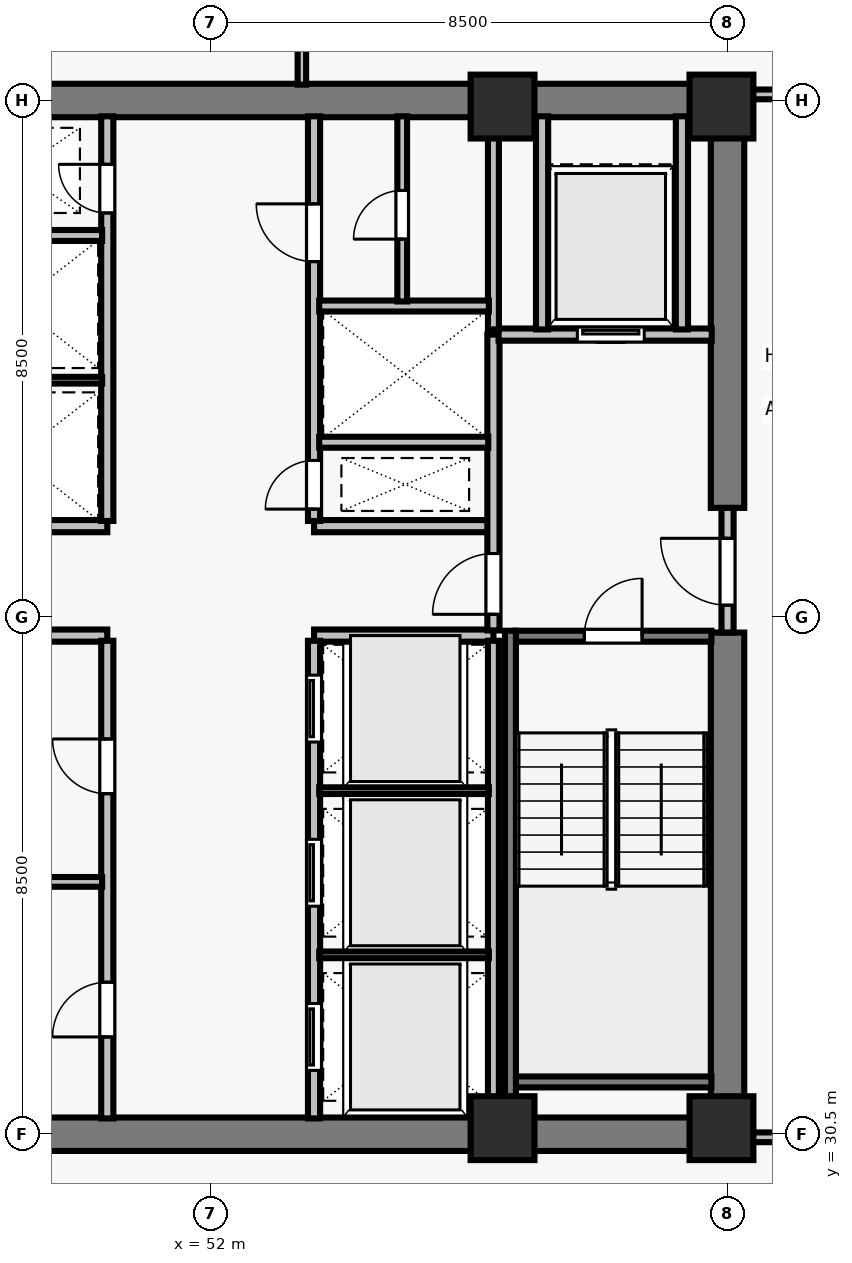
"""IFC4 building model, lengths in metres.
Left out: names, types, materials, properties, quantities, classifications, styles, units other than length and angle.
Written with IfcOpenShell. Run it as: python <this file> out.ifc"""

import sys

from ifc_helpers import new_model, si_unit, direction, frame, frame_2d, origin, origin_2d, place, context, subcontext, project, spatial, rectangle, extrude, element, fill, save


model = new_model("IFC4")
c1 = context("Model", 3, precision=1e-05, world=origin(), true_north=direction((0.0, 1.0)))
c2 = subcontext(c1, "Body", "Model", "MODEL_VIEW")
j1 = project(units=[si_unit("LENGTHUNIT", "METRE"), si_unit("PLANEANGLEUNIT", "RADIAN")], contexts=[c1])
p1 = place(None, origin())
s1 = spatial("IfcSite", under=j1, at=p1, CompositionType="ELEMENT")
p2 = place(p1, origin())
s2 = spatial("IfcBuilding", under=s1, at=p2, CompositionType="ELEMENT")
p3 = place(p2, frame((0.0, 0.0, 190.0)))
s3 = spatial("IfcBuildingStorey", under=s2, at=p3, CompositionType="ELEMENT", Elevation=190.0)
for number, where, z_axis, x_axis in (
    (1, (56.8, 30.6, 0.0), (0.0, 0.0, 1.0), (1.0, 0.0, 0.0)),
    (2, (60.4, 30.6, 0.0), (0.0, 0.0, 1.0), (1.0, 0.0, 0.0)),
    (3, (56.8, 47.4, 0.0), (0.0, 0.0, 1.0), (1.0, 0.0, 0.0)),
    (4, (60.4, 47.4, 0.0), (0.0, 0.0, 1.0), (1.0, 0.0, 0.0)),
):
    element("IfcColumn", number, at=place(p3, frame(where, z_axis=z_axis, x_axis=x_axis)), inside=s3, PredefinedType="COLUMN", context=c2, shape_type="SweptSolid", body=[
        extrude(rectangle(XDim=1.05, YDim=1.05, at=origin_2d()), origin(), (0.0, 0.0, 1.0), 3.5),
    ])
for number, where, z_axis, x_axis in (
    (5, (43.225, 30.5, 0.0), (0.0, 0.0, 1.0), (1.0, 0.0, 0.0)),
    (6, (43.225, 47.5, 0.0), (0.0, 0.0, 1.0), (1.0, 0.0, 0.0)),
):
    element("IfcWall", number, at=place(p3, frame(where, z_axis=z_axis, x_axis=x_axis)), inside=s3, PredefinedType="SHEAR", context=c2, shape_type="SweptSolid", body=[
        extrude(rectangle(XDim=17.55, YDim=0.55, at=frame_2d((8.775, 0.0))), origin(), (0.0, 0.0, 1.0), 3.24),
    ])
p4 = place(p3, frame((60.5, 30.765, 0.0), z_axis=(0.0, 0.0, 1.0), x_axis=(0.0, 1.0, 0.0)))
e7 = element("IfcWall", 7, at=p4, inside=s3, PredefinedType="SHEAR", context=c2, shape_type="SweptSolid", body=[
    extrude(rectangle(XDim=7.985, YDim=0.55, at=frame_2d((3.993, 0.0))), origin(), (0.0, 0.0, 1.0), 3.24),
])
p5 = place(p3, frame((60.5, 40.8, 0.0), z_axis=(0.0, 0.0, 1.0), x_axis=(0.0, 1.0, 0.0)))
e8 = element("IfcWall", 8, at=p5, inside=s3, PredefinedType="SHEAR", context=c2, shape_type="SweptSolid", body=[
    extrude(rectangle(XDim=6.435, YDim=0.55, at=frame_2d((3.218, 0.0))), origin(), (0.0, 0.0, 1.0), 3.24),
])
for number, where, z_axis, x_axis in (
    (9, (47.35, 38.7, 0.0), (0.0, 0.0, 1.0), (1.0, 0.0, 0.0)),
    (10, (47.35, 40.5, 0.0), (0.0, 0.0, 1.0), (1.0, 0.0, 0.0)),
    (11, (53.7, 38.7, 0.0), (0.0, 0.0, 1.0), (1.0, 0.0, 0.0)),
    (12, (53.7, 40.5, 0.0), (0.0, 0.0, 1.0), (1.0, 0.0, 0.0)),
):
    element("IfcWall", number, at=place(p3, frame(where, z_axis=z_axis, x_axis=x_axis)), inside=s3, PredefinedType="SOLIDWALL", context=c2, shape_type="SweptSolid", body=[
        extrude(rectangle(XDim=2.95, YDim=0.2, at=frame_2d((1.475, 0.0))), origin(), (0.0, 0.0, 1.0), 3.24),
    ])
p6 = place(p3, frame((50.3, 30.76, 0.0), z_axis=(0.0, 0.0, 1.0), x_axis=(0.0, 1.0, 0.0)))
e13 = element("IfcWall", 13, at=p6, inside=s3, PredefinedType="SOLIDWALL", context=c2, shape_type="SweptSolid", body=[
    extrude(rectangle(XDim=7.855, YDim=0.2, at=frame_2d((3.927, 0.0))), origin(), (0.0, 0.0, 1.0), 3.24),
])
p7 = place(p6, frame((1.34, 0.0, 0.0)))
e14 = element("IfcOpeningElement", 14, at=p7, cuts=e13, PredefinedType="OPENING", context=c2, shape_type="SweptSolid", body=[
    extrude(rectangle(XDim=0.9, YDim=2.12, at=frame_2d((0.45, 1.06))), frame((0.0, 0.11, 0.0), z_axis=(0.0, -1.0, 0.0), x_axis=(1.0, 0.0, 0.0)), (0.0, 0.0, 1.0), 0.22),
])
p8 = place(p6, frame((5.34, 0.0, 0.0)))
e15 = element("IfcOpeningElement", 15, at=p8, cuts=e13, PredefinedType="OPENING", context=c2, shape_type="SweptSolid", body=[
    extrude(rectangle(XDim=0.9, YDim=2.12, at=frame_2d((0.45, 1.06))), frame((0.0, 0.11, 0.0), z_axis=(0.0, -1.0, 0.0), x_axis=(1.0, 0.0, 0.0)), (0.0, 0.0, 1.0), 0.22),
])
p9 = place(p3, frame((53.7, 30.76, 0.0), z_axis=(0.0, 0.0, 1.0), x_axis=(0.0, 1.0, 0.0)))
e16 = element("IfcWall", 16, at=p9, inside=s3, PredefinedType="SOLIDWALL", context=c2, shape_type="SweptSolid", body=[
    extrude(rectangle(XDim=7.855, YDim=0.2, at=frame_2d((3.927, 0.0))), origin(), (0.0, 0.0, 1.0), 3.24),
])
p10 = place(p9, frame((0.79, 0.0, 0.0)))
e17 = element("IfcOpeningElement", 17, at=p10, cuts=e16, PredefinedType="OPENING", context=c2, shape_type="SweptSolid", body=[
    extrude(rectangle(XDim=1.1, YDim=2.2, at=frame_2d((0.55, 1.1))), frame((0.0, 0.11, 0.0), z_axis=(0.0, -1.0, 0.0), x_axis=(1.0, 0.0, 0.0)), (0.0, 0.0, 1.0), 0.22),
])
p11 = place(p9, frame((3.49, 0.0, 0.0)))
e18 = element("IfcOpeningElement", 18, at=p11, cuts=e16, PredefinedType="OPENING", context=c2, shape_type="SweptSolid", body=[
    extrude(rectangle(XDim=1.1, YDim=2.2, at=frame_2d((0.55, 1.1))), frame((0.0, 0.11, 0.0), z_axis=(0.0, -1.0, 0.0), x_axis=(1.0, 0.0, 0.0)), (0.0, 0.0, 1.0), 0.22),
])
p12 = place(p9, frame((6.19, 0.0, 0.0)))
e19 = element("IfcOpeningElement", 19, at=p12, cuts=e16, PredefinedType="OPENING", context=c2, shape_type="SweptSolid", body=[
    extrude(rectangle(XDim=1.1, YDim=2.2, at=frame_2d((0.55, 1.1))), frame((0.0, 0.11, 0.0), z_axis=(0.0, -1.0, 0.0), x_axis=(1.0, 0.0, 0.0)), (0.0, 0.0, 1.0), 0.22),
])
p13 = place(p3, frame((50.3, 40.585, 0.0), z_axis=(0.0, 0.0, 1.0), x_axis=(0.0, 1.0, 0.0)))
e20 = element("IfcWall", 20, at=p13, inside=s3, PredefinedType="SOLIDWALL", context=c2, shape_type="SweptSolid", body=[
    extrude(rectangle(XDim=6.655, YDim=0.2, at=frame_2d((3.328, 0.0))), origin(), (0.0, 0.0, 1.0), 3.24),
])
p14 = place(p13, frame((5.065, 0.0, 0.0)))
e21 = element("IfcOpeningElement", 21, at=p14, cuts=e20, PredefinedType="OPENING", context=c2, shape_type="SweptSolid", body=[
    extrude(rectangle(XDim=0.8, YDim=2.08, at=frame_2d((0.4, 1.04))), frame((0.0, 0.11, 0.0), z_axis=(0.0, -1.0, 0.0), x_axis=(1.0, 0.0, 0.0)), (0.0, 0.0, 1.0), 0.22),
])
p15 = place(p3, frame((53.7, 40.585, 0.0), z_axis=(0.0, 0.0, 1.0), x_axis=(0.0, 1.0, 0.0)))
e22 = element("IfcWall", 22, at=p15, inside=s3, PredefinedType="SOLIDWALL", context=c2, shape_type="SweptSolid", body=[
    extrude(rectangle(XDim=6.655, YDim=0.2, at=frame_2d((3.328, 0.0))), origin(), (0.0, 0.0, 1.0), 3.24),
])
p16 = place(p15, frame((0.195, 0.0, 0.0)))
e23 = element("IfcOpeningElement", 23, at=p16, cuts=e22, PredefinedType="OPENING", context=c2, shape_type="SweptSolid", body=[
    extrude(rectangle(XDim=0.8, YDim=2.08, at=frame_2d((0.4, 1.04))), frame((0.0, 0.11, 0.0), z_axis=(0.0, -1.0, 0.0), x_axis=(1.0, 0.0, 0.0)), (0.0, 0.0, 1.0), 0.22),
])
p17 = place(p15, frame((4.265, 0.0, 0.0)))
e24 = element("IfcOpeningElement", 24, at=p17, cuts=e22, PredefinedType="OPENING", context=c2, shape_type="SweptSolid", body=[
    extrude(rectangle(XDim=0.95, YDim=2.12, at=frame_2d((0.475, 1.06))), frame((0.0, 0.11, 0.0), z_axis=(0.0, -1.0, 0.0), x_axis=(1.0, 0.0, 0.0)), (0.0, 0.0, 1.0), 0.22),
])
p18 = place(p3, frame((60.5, 38.75, 0.0), z_axis=(0.0, 0.0, 1.0), x_axis=(0.0, 1.0, 0.0)))
e25 = element("IfcWall", 25, at=p18, inside=s3, PredefinedType="SOLIDWALL", context=c2, shape_type="SweptSolid", body=[
    extrude(rectangle(XDim=2.05, YDim=0.2, at=frame_2d((1.025, 0.0))), origin(), (0.0, 0.0, 1.0), 3.24),
])
p19 = place(p18, frame((0.45, 0.0, 0.0)))
e26 = element("IfcOpeningElement", 26, at=p19, cuts=e25, PredefinedType="OPENING", context=c2, shape_type="SweptSolid", body=[
    extrude(rectangle(XDim=1.1, YDim=2.15, at=frame_2d((0.55, 1.075))), frame((0.0, 0.11, 0.0), z_axis=(0.0, -1.0, 0.0), x_axis=(1.0, 0.0, 0.0)), (0.0, 0.0, 1.0), 0.22),
])
p20 = place(p3, frame((56.65, 38.785, 0.0), z_axis=(0.0, 0.0, 1.0), x_axis=(0.0, 1.0, 0.0)))
e27 = element("IfcWall", 27, at=p20, inside=s3, PredefinedType="SOLIDWALL", context=c2, shape_type="SweptSolid", body=[
    extrude(rectangle(XDim=4.865, YDim=0.2, at=frame_2d((2.433, 0.0))), origin(), (0.0, 0.0, 1.0), 3.24),
])
p21 = place(p20, frame((0.265, 0.0, 0.0)))
e28 = element("IfcOpeningElement", 28, at=p21, cuts=e27, PredefinedType="OPENING", context=c2, shape_type="SweptSolid", body=[
    extrude(rectangle(XDim=1.0, YDim=2.15, at=frame_2d((0.5, 1.075))), frame((0.0, 0.11, 0.0), z_axis=(0.0, -1.0, 0.0), x_axis=(1.0, 0.0, 0.0)), (0.0, 0.0, 1.0), 0.22),
])
p22 = place(p3, frame((56.735, 43.65, 0.0), z_axis=(0.0, 0.0, 1.0), x_axis=(1.0, 0.0, 0.0)))
e29 = element("IfcWall", 29, at=p22, inside=s3, PredefinedType="SOLIDWALL", context=c2, shape_type="SweptSolid", body=[
    extrude(rectangle(XDim=3.505, YDim=0.2, at=frame_2d((1.752, 0.0))), origin(), (0.0, 0.0, 1.0), 3.24),
])
p23 = place(p22, frame((1.295, 0.0, 0.0)))
e30 = element("IfcOpeningElement", 30, at=p23, cuts=e29, PredefinedType="OPENING", context=c2, shape_type="SweptSolid", body=[
    extrude(rectangle(XDim=1.1, YDim=2.2, at=frame_2d((0.55, 1.1))), frame((0.0, 0.11, 0.0), z_axis=(0.0, -1.0, 0.0), x_axis=(1.0, 0.0, 0.0)), (0.0, 0.0, 1.0), 0.22),
])
for number, where, z_axis, x_axis in (
    (31, (57.45, 43.735, 0.0), (0.0, 0.0, 1.0), (0.0, 1.0, 0.0)),
    (32, (59.75, 43.735, 0.0), (0.0, 0.0, 1.0), (0.0, 1.0, 0.0)),
):
    element("IfcWall", number, at=place(p3, frame(where, z_axis=z_axis, x_axis=x_axis)), inside=s3, PredefinedType="SOLIDWALL", context=c2, shape_type="SweptSolid", body=[
        extrude(rectangle(XDim=3.505, YDim=0.2, at=frame_2d((1.752, 0.0))), origin(), (0.0, 0.0, 1.0), 3.24),
    ])
p24 = place(p3, frame((47.415, 34.65, 0.0), z_axis=(0.0, 0.0, 1.0), x_axis=(1.0, 0.0, 0.0)))
e33 = element("IfcWall", 33, at=p24, inside=s3, PredefinedType="PARTITIONING", context=c2, shape_type="SweptSolid", body=[
    extrude(rectangle(XDim=2.8, YDim=0.16, at=frame_2d((1.4, 0.0))), origin(), (0.0, 0.0, 1.0), 3.24),
])
p25 = place(p3, frame((56.65, 30.76, 0.0), z_axis=(0.0, 0.0, 1.0), x_axis=(0.0, 1.0, 0.0)))
e34 = element("IfcWall", 34, at=p25, inside=s3, PredefinedType="SOLIDWALL", context=c2, shape_type="SweptSolid", body=[
    extrude(rectangle(XDim=7.855, YDim=0.18, at=frame_2d((3.927, 0.0))), origin(), (0.0, 0.0, 1.0), 3.24),
])
for number, where, z_axis, x_axis in (
    (35, (53.785, 33.45, 0.0), (0.0, 0.0, 1.0), (1.0, 0.0, 0.0)),
    (36, (53.785, 36.15, 0.0), (0.0, 0.0, 1.0), (1.0, 0.0, 0.0)),
):
    element("IfcWall", number, at=place(p3, frame(where, z_axis=z_axis, x_axis=x_axis)), inside=s3, PredefinedType="PARTITIONING", context=c2, shape_type="SweptSolid", body=[
        extrude(rectangle(XDim=2.79, YDim=0.11, at=frame_2d((1.395, 0.0))), origin(), (0.0, 0.0, 1.0), 3.24),
    ])
p26 = place(p3, frame((47.435, 42.9, 0.0), z_axis=(0.0, 0.0, 1.0), x_axis=(1.0, 0.0, 0.0)))
e37 = element("IfcWall", 37, at=p26, inside=s3, PredefinedType="PARTITIONING", context=c2, shape_type="SweptSolid", body=[
    extrude(rectangle(XDim=2.78, YDim=0.11, at=frame_2d((1.39, 0.0))), origin(), (0.0, 0.0, 1.0), 3.24),
])
p27 = place(p3, frame((47.425, 45.28, 0.0), z_axis=(0.0, 0.0, 1.0), x_axis=(1.0, 0.0, 0.0)))
e38 = element("IfcWall", 38, at=p27, inside=s3, PredefinedType="SOLIDWALL", context=c2, shape_type="SweptSolid", body=[
    extrude(rectangle(XDim=2.79, YDim=0.18, at=frame_2d((1.395, 0.0))), origin(), (0.0, 0.0, 1.0), 3.24),
])
p28 = place(p3, frame((56.65, 43.735, 0.0), z_axis=(0.0, 0.0, 1.0), x_axis=(0.0, 1.0, 0.0)))
e39 = element("IfcWall", 39, at=p28, inside=s3, PredefinedType="SOLIDWALL", context=c2, shape_type="SweptSolid", body=[
    extrude(rectangle(XDim=3.505, YDim=0.18, at=frame_2d((1.752, 0.0))), origin(), (0.0, 0.0, 1.0), 3.24),
])
p29 = place(p3, frame((53.785, 41.88, 0.0), z_axis=(0.0, 0.0, 1.0), x_axis=(1.0, 0.0, 0.0)))
e40 = element("IfcWall", 40, at=p29, inside=s3, PredefinedType="SOLIDWALL", context=c2, shape_type="SweptSolid", body=[
    extrude(rectangle(XDim=2.78, YDim=0.18, at=frame_2d((1.39, 0.0))), origin(), (0.0, 0.0, 1.0), 3.24),
])
p30 = place(p3, frame((53.785, 44.12, 0.0), z_axis=(0.0, 0.0, 1.0), x_axis=(1.0, 0.0, 0.0)))
e41 = element("IfcWall", 41, at=p30, inside=s3, PredefinedType="SOLIDWALL", context=c2, shape_type="SweptSolid", body=[
    extrude(rectangle(XDim=2.79, YDim=0.18, at=frame_2d((1.395, 0.0))), origin(), (0.0, 0.0, 1.0), 3.24),
])
p31 = place(p3, frame((55.15, 44.195, 0.0), z_axis=(0.0, 0.0, 1.0), x_axis=(0.0, 1.0, 0.0)))
e42 = element("IfcWall", 42, at=p31, inside=s3, PredefinedType="PARTITIONING", context=c2, shape_type="SweptSolid", body=[
    extrude(rectangle(XDim=3.045, YDim=0.16, at=frame_2d((1.522, 0.0))), origin(), (0.0, 0.0, 1.0), 3.24),
])
p32 = place(p31, frame((1.025, 0.0, 0.0)))
e43 = element("IfcOpeningElement", 43, at=p32, cuts=e42, PredefinedType="OPENING", context=c2, shape_type="SweptSolid", body=[
    extrude(rectangle(XDim=0.8, YDim=2.1, at=frame_2d((0.4, 1.05))), frame((0.0, 0.09, 0.0), z_axis=(0.0, -1.0, 0.0), x_axis=(1.0, 0.0, 0.0)), (0.0, 0.0, 1.0), 0.18),
])
p33 = place(p3, frame((60.765, 30.45, 0.0), z_axis=(0.0, 0.0, 1.0), x_axis=(1.0, 0.0, 0.0)))
e44 = element("IfcWall", 44, at=p33, inside=s3, PredefinedType="PARTITIONING", context=c2, shape_type="SweptSolid", body=[
    extrude(rectangle(XDim=2.785, YDim=0.16, at=frame_2d((1.393, 0.0))), origin(), (0.0, 0.0, 1.0), 3.24),
])
p34 = place(p3, frame((60.765, 47.6, 0.0), z_axis=(0.0, 0.0, 1.0), x_axis=(1.0, 0.0, 0.0)))
e45 = element("IfcWall", 45, at=p34, inside=s3, PredefinedType="PARTITIONING", context=c2, shape_type="SweptSolid", body=[
    extrude(rectangle(XDim=2.72, YDim=0.16, at=frame_2d((1.36, 0.0))), origin(), (0.0, 0.0, 1.0), 3.24),
])
p35 = place(p3, frame((53.5, 47.76, 0.0), z_axis=(0.0, 0.0, 1.0), x_axis=(0.0, 1.0, 0.0)))
e46 = element("IfcWall", 46, at=p35, inside=s3, PredefinedType="PARTITIONING", context=c2, shape_type="SweptSolid", body=[
    extrude(rectangle(XDim=14.915, YDim=0.14, at=frame_2d((7.458, 0.0))), origin(), (0.0, 0.0, 1.0), 2.856),
])
p36 = place(p3, frame((57.005, 38.69, 0.0), z_axis=(0.0, 0.0, 1.0), x_axis=(1.0, 0.0, 0.0)))
e47 = element("IfcWall", 47, at=p36, inside=s3, PredefinedType="SOLIDWALL", context=c2, shape_type="SweptSolid", body=[
    extrude(rectangle(XDim=3.23, YDim=0.18, at=frame_2d((1.615, 0.0))), origin(), (0.0, 0.0, 1.0), 3.24),
])
p37 = place(p36, frame((1.14, 0.0, 0.0)))
e48 = element("IfcOpeningElement", 48, at=p37, cuts=e47, PredefinedType="OPENING", context=c2, shape_type="SweptSolid", body=[
    extrude(rectangle(XDim=0.95, YDim=2.15, at=frame_2d((0.475, 1.075))), frame((0.0, 0.1, 0.0), z_axis=(0.0, -1.0, 0.0), x_axis=(1.0, 0.0, 0.0)), (0.0, 0.0, 1.0), 0.2),
])
p38 = place(p3, frame((57.005, 31.36, 0.0), z_axis=(0.0, 0.0, 1.0), x_axis=(1.0, 0.0, 0.0)))
e49 = element("IfcWall", 49, at=p38, inside=s3, PredefinedType="SOLIDWALL", context=c2, shape_type="SweptSolid", body=[
    extrude(rectangle(XDim=3.23, YDim=0.18, at=frame_2d((1.615, 0.0))), origin(), (0.0, 0.0, 1.0), 3.24),
])
p39 = place(p3, frame((56.93, 38.78, 0.0), z_axis=(0.0, 0.0, 1.0), x_axis=(0.0, -1.0, 0.0)))
e50 = element("IfcWall", 50, at=p39, inside=s3, PredefinedType="SOLIDWALL", context=c2, shape_type="SweptSolid", body=[
    extrude(rectangle(XDim=8.017, YDim=0.18, at=frame_2d((4.009, 0.0))), origin(), (0.0, 0.0, 1.0), 3.24),
])
p40 = place(p19, origin())
e51 = element("IfcDoor", 51, at=p40, inside=s3, OperationType="SINGLE_SWING_RIGHT", PredefinedType="DOOR", context=c2, shape_type="SweptSolid", body=[
    extrude(rectangle(XDim=1.1, YDim=2.15, at=frame_2d((0.55, 1.075))), frame((0.0, 0.025, 0.0), z_axis=(0.0, -1.0, 0.0), x_axis=(1.0, 0.0, 0.0)), (0.0, 0.0, 1.0), 0.05),
])
fill(e26, e51)
p41 = place(p21, origin())
e52 = element("IfcDoor", 52, at=p41, inside=s3, OperationType="SINGLE_SWING_LEFT", PredefinedType="DOOR", context=c2, shape_type="SweptSolid", body=[
    extrude(rectangle(XDim=1.0, YDim=2.15, at=frame_2d((0.5, 1.075))), frame((0.0, 0.025, 0.0), z_axis=(0.0, -1.0, 0.0), x_axis=(1.0, 0.0, 0.0)), (0.0, 0.0, 1.0), 0.05),
])
fill(e28, e52)
p42 = place(p23, origin())
e53 = element("IfcDoor", 53, at=p42, inside=s3, OperationType="SLIDING_TO_LEFT", PredefinedType="DOOR", context=c2, shape_type="SweptSolid", body=[
    extrude(rectangle(XDim=1.1, YDim=2.2, at=frame_2d((0.55, 1.1))), frame((0.0, 0.025, 0.0), z_axis=(0.0, -1.0, 0.0), x_axis=(1.0, 0.0, 0.0)), (0.0, 0.0, 1.0), 0.05),
])
fill(e30, e53)
p43 = place(p7, origin())
e54 = element("IfcDoor", 54, at=p43, inside=s3, OperationType="SINGLE_SWING_LEFT", PredefinedType="DOOR", context=c2, shape_type="SweptSolid", body=[
    extrude(rectangle(XDim=0.9, YDim=2.12, at=frame_2d((0.45, 1.06))), frame((0.0, 0.025, 0.0), z_axis=(0.0, -1.0, 0.0), x_axis=(1.0, 0.0, 0.0)), (0.0, 0.0, 1.0), 0.05),
])
fill(e14, e54)
p44 = place(p8, origin())
e55 = element("IfcDoor", 55, at=p44, inside=s3, OperationType="SINGLE_SWING_RIGHT", PredefinedType="DOOR", context=c2, shape_type="SweptSolid", body=[
    extrude(rectangle(XDim=0.9, YDim=2.12, at=frame_2d((0.45, 1.06))), frame((0.0, 0.025, 0.0), z_axis=(0.0, -1.0, 0.0), x_axis=(1.0, 0.0, 0.0)), (0.0, 0.0, 1.0), 0.05),
])
fill(e15, e55)
p45 = place(p10, origin())
e56 = element("IfcDoor", 56, at=p45, inside=s3, OperationType="SLIDING_TO_LEFT", PredefinedType="DOOR", context=c2, shape_type="SweptSolid", body=[
    extrude(rectangle(XDim=1.1, YDim=2.2, at=frame_2d((0.55, 1.1))), frame((0.0, 0.025, 0.0), z_axis=(0.0, -1.0, 0.0), x_axis=(1.0, 0.0, 0.0)), (0.0, 0.0, 1.0), 0.05),
])
fill(e17, e56)
p46 = place(p11, origin())
e57 = element("IfcDoor", 57, at=p46, inside=s3, OperationType="SLIDING_TO_LEFT", PredefinedType="DOOR", context=c2, shape_type="SweptSolid", body=[
    extrude(rectangle(XDim=1.1, YDim=2.2, at=frame_2d((0.55, 1.1))), frame((0.0, 0.025, 0.0), z_axis=(0.0, -1.0, 0.0), x_axis=(1.0, 0.0, 0.0)), (0.0, 0.0, 1.0), 0.05),
])
fill(e18, e57)
p47 = place(p12, origin())
e58 = element("IfcDoor", 58, at=p47, inside=s3, OperationType="SLIDING_TO_LEFT", PredefinedType="DOOR", context=c2, shape_type="SweptSolid", body=[
    extrude(rectangle(XDim=1.1, YDim=2.2, at=frame_2d((0.55, 1.1))), frame((0.0, 0.025, 0.0), z_axis=(0.0, -1.0, 0.0), x_axis=(1.0, 0.0, 0.0)), (0.0, 0.0, 1.0), 0.05),
])
fill(e19, e58)
p48 = place(p14, origin())
e59 = element("IfcDoor", 59, at=p48, inside=s3, OperationType="SINGLE_SWING_RIGHT", PredefinedType="DOOR", context=c2, shape_type="SweptSolid", body=[
    extrude(rectangle(XDim=0.8, YDim=2.08, at=frame_2d((0.4, 1.04))), frame((0.0, 0.025, 0.0), z_axis=(0.0, -1.0, 0.0), x_axis=(1.0, 0.0, 0.0)), (0.0, 0.0, 1.0), 0.05),
])
fill(e21, e59)
p49 = place(p16, origin())
e60 = element("IfcDoor", 60, at=p49, inside=s3, OperationType="SINGLE_SWING_LEFT", PredefinedType="DOOR", context=c2, shape_type="SweptSolid", body=[
    extrude(rectangle(XDim=0.8, YDim=2.08, at=frame_2d((0.4, 1.04))), frame((0.0, 0.025, 0.0), z_axis=(0.0, -1.0, 0.0), x_axis=(1.0, 0.0, 0.0)), (0.0, 0.0, 1.0), 0.05),
])
fill(e23, e60)
p50 = place(p17, origin())
e61 = element("IfcDoor", 61, at=p50, inside=s3, OperationType="SINGLE_SWING_RIGHT", PredefinedType="DOOR", context=c2, shape_type="SweptSolid", body=[
    extrude(rectangle(XDim=0.95, YDim=2.12, at=frame_2d((0.475, 1.06))), frame((0.0, 0.025, 0.0), z_axis=(0.0, -1.0, 0.0), x_axis=(1.0, 0.0, 0.0)), (0.0, 0.0, 1.0), 0.05),
])
fill(e24, e61)
p51 = place(p32, origin())
e62 = element("IfcDoor", 62, at=p51, inside=s3, OperationType="SINGLE_SWING_LEFT", PredefinedType="DOOR", context=c2, shape_type="SweptSolid", body=[
    extrude(rectangle(XDim=0.8, YDim=2.1, at=frame_2d((0.4, 1.05))), frame((0.0, 0.025, 0.0), z_axis=(0.0, -1.0, 0.0), x_axis=(1.0, 0.0, 0.0)), (0.0, 0.0, 1.0), 0.05),
])
fill(e43, e62)
p52 = place(p37, origin())
e63 = element("IfcDoor", 63, at=p52, inside=s3, OperationType="SINGLE_SWING_RIGHT", PredefinedType="DOOR", context=c2, shape_type="SweptSolid", body=[
    extrude(rectangle(XDim=0.95, YDim=2.15, at=frame_2d((0.475, 1.075))), frame((0.0, 0.025, 0.0), z_axis=(0.0, -1.0, 0.0), x_axis=(1.0, 0.0, 0.0)), (0.0, 0.0, 1.0), 0.05),
])
fill(e48, e63)
save(model, sys.argv[1])
